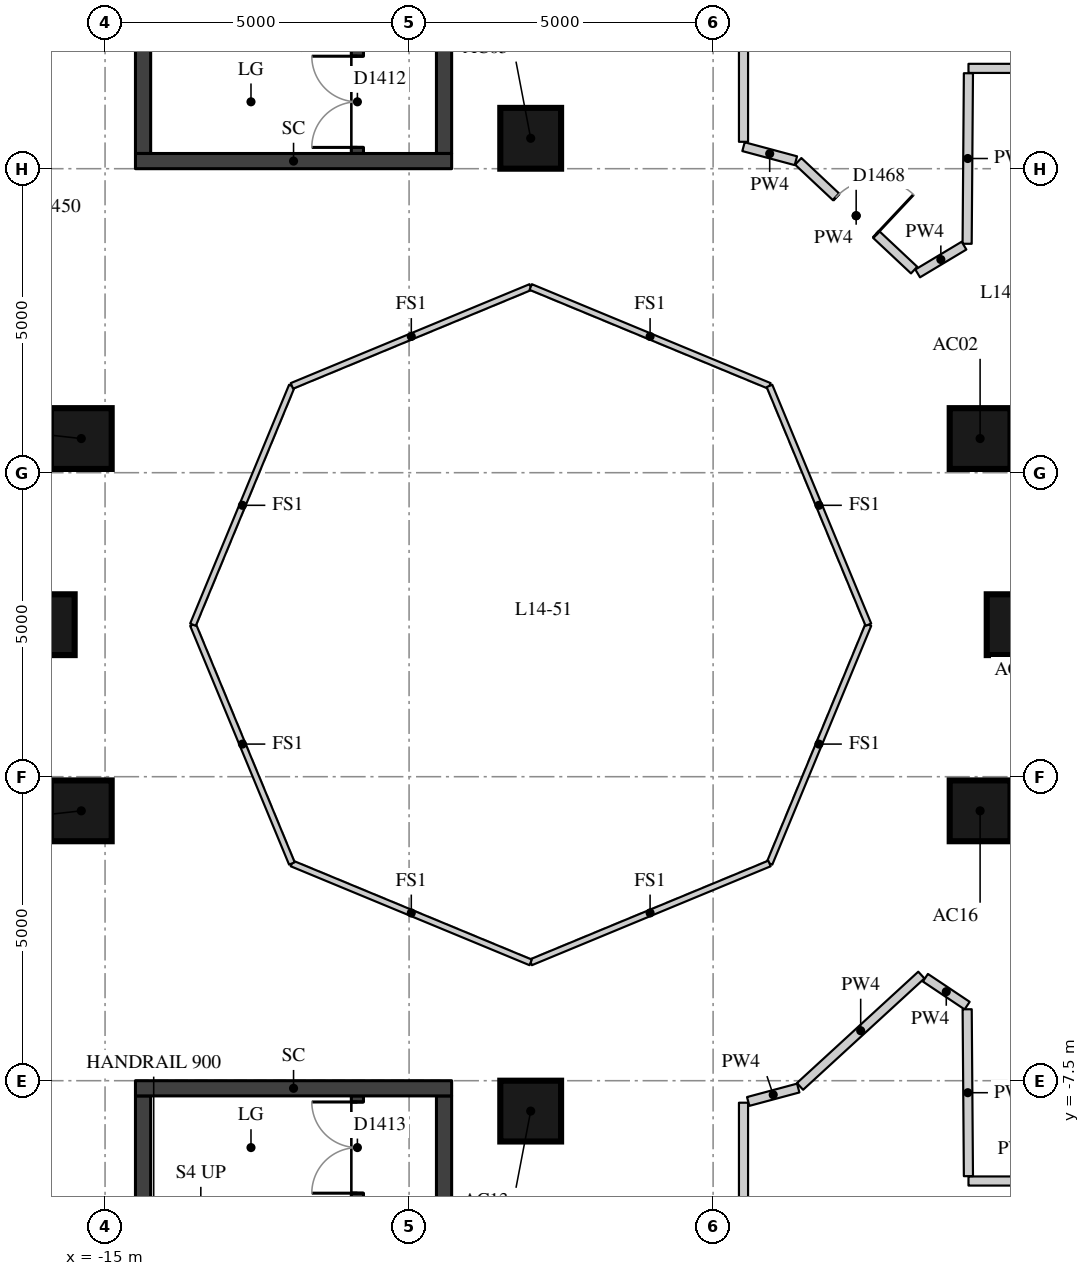
"""IFC4 building model, lengths in metres.
Left out: names, types, materials, properties, quantities, classifications, styles, units other than length and angle.
Written with IfcOpenShell. Run it as: python <this file> out.ifc"""

import sys

from ifc_helpers import new_model, si_unit, direction, frame, frame_2d, origin, origin_2d, place, context, subcontext, project, spatial, rectangle, extrude, element, fill, save


model = new_model("IFC4")
c1 = context("Model", 3, precision=1e-05, world=origin(), true_north=direction((0.0, 1.0)))
c2 = subcontext(c1, "Body", "Model", "MODEL_VIEW")
j1 = project(units=[si_unit("LENGTHUNIT", "METRE"), si_unit("PLANEANGLEUNIT", "RADIAN")], contexts=[c1])
p1 = place(None, origin())
s1 = spatial("IfcSite", under=j1, at=p1, CompositionType="ELEMENT")
p2 = place(p1, origin())
s2 = spatial("IfcBuilding", under=s1, at=p2, CompositionType="ELEMENT")
p3 = place(p2, frame((0.0, 0.0, 54.7)))
s3 = spatial("IfcBuildingStorey", under=s2, at=p3, CompositionType="ELEMENT", Elevation=54.7)
for number, where, z_axis, x_axis in (
    (1, (0.0, 0.0, 0.0), (0.0, 0.0, 1.0), (1.0, 0.0, 0.0)),
    (2, (-0.609, 3.062, 0.0), (0.0, 0.0, 1.0), (1.0, 0.0, 0.0)),
    (3, (-8.0, 8.0, 0.0), (0.0, 0.0, 1.0), (1.0, 0.0, 0.0)),
    (4, (-15.391, 3.062, 0.0), (0.0, 0.0, 1.0), (1.0, 0.0, 0.0)),
    (5, (-16.0, 0.0, 0.0), (0.0, 0.0, 1.0), (1.0, 0.0, 0.0)),
    (6, (-15.391, -3.062, 0.0), (0.0, 0.0, 1.0), (1.0, 0.0, 0.0)),
    (7, (-8.0, -8.0, 0.0), (0.0, 0.0, 1.0), (1.0, 0.0, 0.0)),
    (8, (-0.609, -3.062, 0.0), (0.0, 0.0, 1.0), (1.0, 0.0, 0.0)),
):
    element("IfcColumn", number, at=place(p3, frame(where, z_axis=z_axis, x_axis=x_axis)), inside=s3, PredefinedType="COLUMN", context=c2, shape_type="SweptSolid", body=[
        extrude(rectangle(XDim=1.0, YDim=1.0, at=origin_2d()), origin(), (0.0, 0.0, 1.0), 3.3),
    ])
p4 = place(p3, frame((-10.85, 7.75, 0.0), z_axis=(0.0, 0.0, 1.0), x_axis=(0.0, 1.0, 0.0)))
e9 = element("IfcWall", 9, at=p4, inside=s3, PredefinedType="SHEAR", context=c2, shape_type="SweptSolid", body=[
    extrude(rectangle(XDim=6.0, YDim=0.2, at=frame_2d((3.0, 0.0))), origin(), (0.0, 0.0, 1.0), 3.02),
])
p5 = place(p4, frame((0.1, 0.0, 0.0)))
e10 = element("IfcOpeningElement", 10, at=p5, cuts=e9, PredefinedType="OPENING", context=c2, shape_type="SweptSolid", body=[
    extrude(rectangle(XDim=1.5, YDim=2.1, at=frame_2d((0.75, 1.05))), frame((0.0, 0.11, 0.0), z_axis=(0.0, -1.0, 0.0), x_axis=(1.0, 0.0, 0.0)), (0.0, 0.0, 1.0), 0.22),
])
p6 = place(p3, frame((-10.85, -13.75, 0.0), z_axis=(0.0, 0.0, 1.0), x_axis=(0.0, 1.0, 0.0)))
e11 = element("IfcWall", 11, at=p6, inside=s3, PredefinedType="SHEAR", context=c2, shape_type="SweptSolid", body=[
    extrude(rectangle(XDim=6.0, YDim=0.2, at=frame_2d((3.0, 0.0))), origin(), (0.0, 0.0, 1.0), 3.02),
])
p7 = place(p6, frame((4.4, 0.0, 0.0)))
e12 = element("IfcOpeningElement", 12, at=p7, cuts=e11, PredefinedType="OPENING", context=c2, shape_type="SweptSolid", body=[
    extrude(rectangle(XDim=1.5, YDim=2.1, at=frame_2d((0.75, 1.05))), frame((0.0, 0.11, 0.0), z_axis=(0.0, -1.0, 0.0), x_axis=(1.0, 0.0, 0.0)), (0.0, 0.0, 1.0), 0.22),
])
p8 = place(p3, frame((-14.375, 7.75, -0.28), z_axis=(0.0, 0.0, 1.0), x_axis=(0.0, 1.0, 0.0)))
e13 = element("IfcWall", 13, at=p8, inside=s3, PredefinedType="SHEAR", context=c2, shape_type="SweptSolid", body=[
    extrude(rectangle(XDim=6.0, YDim=0.25, at=frame_2d((3.0, 0.0))), origin(), (0.0, 0.0, 1.0), 3.3),
])
p9 = place(p3, frame((-9.425, 7.75, -0.28), z_axis=(0.0, 0.0, 1.0), x_axis=(0.0, 1.0, 0.0)))
e14 = element("IfcWall", 14, at=p9, inside=s3, PredefinedType="SHEAR", context=c2, shape_type="SweptSolid", body=[
    extrude(rectangle(XDim=6.0, YDim=0.25, at=frame_2d((3.0, 0.0))), origin(), (0.0, 0.0, 1.0), 3.3),
])
p10 = place(p9, frame((2.1, 0.0, 0.28)))
e15 = element("IfcOpeningElement", 15, at=p10, cuts=e14, PredefinedType="OPENING", context=c2, shape_type="SweptSolid", body=[
    extrude(rectangle(XDim=1.5, YDim=2.1, at=frame_2d((0.75, 1.05))), frame((0.0, 0.135, 0.0), z_axis=(0.0, -1.0, 0.0), x_axis=(1.0, 0.0, 0.0)), (0.0, 0.0, 1.0), 0.27),
])
p11 = place(p3, frame((-14.5, 7.625, -0.28), z_axis=(0.0, 0.0, 1.0), x_axis=(1.0, 0.0, 0.0)))
e16 = element("IfcWall", 16, at=p11, inside=s3, PredefinedType="SHEAR", context=c2, shape_type="SweptSolid", body=[
    extrude(rectangle(XDim=5.2, YDim=0.25, at=frame_2d((2.6, 0.0))), origin(), (0.0, 0.0, 1.0), 3.3),
])
p12 = place(p3, frame((-14.375, -13.75, -0.28), z_axis=(0.0, 0.0, 1.0), x_axis=(0.0, 1.0, 0.0)))
e17 = element("IfcWall", 17, at=p12, inside=s3, PredefinedType="SHEAR", context=c2, shape_type="SweptSolid", body=[
    extrude(rectangle(XDim=6.0, YDim=0.25, at=frame_2d((3.0, 0.0))), origin(), (0.0, 0.0, 1.0), 3.3),
])
p13 = place(p3, frame((-9.425, -13.75, -0.28), z_axis=(0.0, 0.0, 1.0), x_axis=(0.0, 1.0, 0.0)))
e18 = element("IfcWall", 18, at=p13, inside=s3, PredefinedType="SHEAR", context=c2, shape_type="SweptSolid", body=[
    extrude(rectangle(XDim=6.0, YDim=0.25, at=frame_2d((3.0, 0.0))), origin(), (0.0, 0.0, 1.0), 3.3),
])
p14 = place(p13, frame((2.4, 0.0, 0.28)))
e19 = element("IfcOpeningElement", 19, at=p14, cuts=e18, PredefinedType="OPENING", context=c2, shape_type="SweptSolid", body=[
    extrude(rectangle(XDim=1.5, YDim=2.1, at=frame_2d((0.75, 1.05))), frame((0.0, 0.135, 0.0), z_axis=(0.0, -1.0, 0.0), x_axis=(1.0, 0.0, 0.0)), (0.0, 0.0, 1.0), 0.27),
])
p15 = place(p3, frame((-14.5, -7.625, -0.28), z_axis=(0.0, 0.0, 1.0), x_axis=(1.0, 0.0, 0.0)))
e20 = element("IfcWall", 20, at=p15, inside=s3, PredefinedType="SHEAR", context=c2, shape_type="SweptSolid", body=[
    extrude(rectangle(XDim=5.2, YDim=0.25, at=frame_2d((2.6, 0.0))), origin(), (0.0, 0.0, 1.0), 3.3),
])
p16 = place(p3, frame((0.72, 9.15, 0.0), z_axis=(0.0, 0.0, 1.0), x_axis=(-1.0, 0.0, 0.0)))
e21 = element("IfcWall", 21, at=p16, inside=s3, PredefinedType="PARTITIONING", context=c2, shape_type="SweptSolid", body=[
    extrude(rectangle(XDim=1.52, YDim=0.15, at=frame_2d((0.76, 0.0))), origin(), (0.0, 0.0, 1.0), 3.02),
])
p17 = place(p3, frame((-0.801, 9.07, 0.0), z_axis=(0.0, 0.0, 1.0), x_axis=(-0.007572902619, -0.999971325162, 0.0)))
e22 = element("IfcWall", 22, at=p17, inside=s3, PredefinedType="PARTITIONING", context=c2, shape_type="SweptSolid", body=[
    extrude(rectangle(XDim=2.805, YDim=0.15, at=frame_2d((1.402, 0.0))), origin(), (0.0, 0.0, 1.0), 3.02),
])
p18 = place(p3, frame((-0.874, 6.234, 0.0), z_axis=(0.0, 0.0, 1.0), x_axis=(-0.857759476535, -0.514051242984, 0.0)))
e23 = element("IfcWall", 23, at=p18, inside=s3, PredefinedType="PARTITIONING", context=c2, shape_type="SweptSolid", body=[
    extrude(rectangle(XDim=0.889, YDim=0.15, at=frame_2d((0.444, 0.0))), origin(), (0.0, 0.0, 1.0), 3.02),
])
p19 = place(p3, frame((-1.694, 5.832, 0.0), z_axis=(0.0, 0.0, 1.0), x_axis=(-0.729170056034, 0.684332542981, 0.0)))
e24 = element("IfcWall", 24, at=p19, inside=s3, PredefinedType="PARTITIONING", context=c2, shape_type="SweptSolid", body=[
    extrude(rectangle(XDim=2.614, YDim=0.15, at=frame_2d((1.307, 0.0))), origin(), (0.0, 0.0, 1.0), 3.02),
])
p20 = place(p19, frame((0.857, 0.0, 0.0)))
e25 = element("IfcOpeningElement", 25, at=p20, cuts=e24, PredefinedType="OPENING", context=c2, shape_type="SweptSolid", body=[
    extrude(rectangle(XDim=0.9, YDim=2.1, at=frame_2d((0.45, 1.05))), frame((0.0, 0.085, 0.0), z_axis=(0.0, -1.0, 0.0), x_axis=(1.0, 0.0, 0.0)), (0.0, 0.0, 1.0), 0.17),
])
p21 = place(p3, frame((-3.639, 7.631, 0.0), z_axis=(0.0, 0.0, 1.0), x_axis=(-0.965879594242, 0.258991523853, 0.0)))
e26 = element("IfcWall", 26, at=p21, inside=s3, PredefinedType="PARTITIONING", context=c2, shape_type="SweptSolid", body=[
    extrude(rectangle(XDim=0.892, YDim=0.15, at=frame_2d((0.446, 0.0))), origin(), (0.0, 0.0, 1.0), 3.02),
])
p22 = place(p3, frame((-4.5, 7.942, 0.0), z_axis=(0.0, 0.0, 1.0), x_axis=(0.0, 1.0, 0.0)))
e27 = element("IfcWall", 27, at=p22, inside=s3, PredefinedType="PARTITIONING", context=c2, shape_type="SweptSolid", body=[
    extrude(rectangle(XDim=3.808, YDim=0.15, at=frame_2d((1.904, 0.0))), origin(), (0.0, 0.0, 1.0), 3.02),
])
p23 = place(p3, frame((-0.8, -9.15, 0.0), z_axis=(0.0, 0.0, 1.0), x_axis=(1.0, 0.0, 0.0)))
e28 = element("IfcWall", 28, at=p23, inside=s3, PredefinedType="PARTITIONING", context=c2, shape_type="SweptSolid", body=[
    extrude(rectangle(XDim=1.6, YDim=0.15, at=frame_2d((0.8, 0.0))), origin(), (0.0, 0.0, 1.0), 3.02),
])
p24 = place(p3, frame((-4.5, -11.67, 0.0), z_axis=(0.0, 0.0, 1.0), x_axis=(0.0, 1.0, 0.0)))
e29 = element("IfcWall", 29, at=p24, inside=s3, PredefinedType="PARTITIONING", context=c2, shape_type="SweptSolid", body=[
    extrude(rectangle(XDim=3.808, YDim=0.15, at=frame_2d((1.904, 0.0))), origin(), (0.0, 0.0, 1.0), 3.02),
])
p25 = place(p3, frame((-4.423, -7.842, 0.0), z_axis=(0.0, 0.0, 1.0), x_axis=(0.965853333569, 0.259089440221, 0.0)))
e30 = element("IfcWall", 30, at=p25, inside=s3, PredefinedType="PARTITIONING", context=c2, shape_type="SweptSolid", body=[
    extrude(rectangle(XDim=0.852, YDim=0.15, at=frame_2d((0.426, 0.0))), origin(), (0.0, 0.0, 1.0), 3.02),
])
p26 = place(p3, frame((-3.571, -7.594, 0.0), z_axis=(0.0, 0.0, 1.0), x_axis=(0.736783660812, 0.676128565555, 0.0)))
e31 = element("IfcWall", 31, at=p26, inside=s3, PredefinedType="PARTITIONING", context=c2, shape_type="SweptSolid", body=[
    extrude(rectangle(XDim=2.709, YDim=0.15, at=frame_2d((1.354, 0.0))), origin(), (0.0, 0.0, 1.0), 3.02),
])
p27 = place(p3, frame((-1.509, -5.806, 0.0), z_axis=(0.0, 0.0, 1.0), x_axis=(0.831367153095, -0.55572354346, 0.0)))
e32 = element("IfcWall", 32, at=p27, inside=s3, PredefinedType="PARTITIONING", context=c2, shape_type="SweptSolid", body=[
    extrude(rectangle(XDim=0.825, YDim=0.15, at=frame_2d((0.413, 0.0))), origin(), (0.0, 0.0, 1.0), 3.02),
])
p28 = place(p3, frame((-0.822, -6.325, 0.0), z_axis=(0.0, 0.0, 1.0), x_axis=(0.007471771501, -0.999972085926, 0.0)))
e33 = element("IfcWall", 33, at=p28, inside=s3, PredefinedType="PARTITIONING", context=c2, shape_type="SweptSolid", body=[
    extrude(rectangle(XDim=2.745, YDim=0.15, at=frame_2d((1.372, 0.0))), origin(), (0.0, 0.0, 1.0), 3.02),
])
for number, where, z_axis, x_axis in (
    (34, (-2.446, 0.0, 0.0), (0.0, 0.0, 1.0), (-0.383, -0.924, 0.0)),
    (35, (-4.073, -3.927, 0.0), (0.0, 0.0, 1.0), (-0.924, -0.383, 0.0)),
    (36, (-8.0, -5.554, 0.0), (0.0, 0.0, 1.0), (-0.924, 0.383, 0.0)),
    (37, (-11.927, -3.927, 0.0), (0.0, 0.0, 1.0), (-0.383, 0.924, 0.0)),
    (38, (-13.554, 0.0, 0.0), (0.0, 0.0, 1.0), (0.383, 0.924, 0.0)),
    (39, (-11.927, 3.927, 0.0), (0.0, 0.0, 1.0), (0.924, 0.383, 0.0)),
    (40, (-8.0, 5.554, 0.0), (0.0, 0.0, 1.0), (0.924, -0.383, 0.0)),
    (41, (-4.073, 3.927, 0.0), (0.0, 0.0, 1.0), (0.383, -0.924, 0.0)),
):
    element("IfcWall", number, at=place(p3, frame(where, z_axis=z_axis, x_axis=x_axis)), inside=s3, PredefinedType="PARTITIONING", context=c2, shape_type="SweptSolid", body=[
        extrude(rectangle(XDim=4.251, YDim=0.1, at=frame_2d((2.125, 0.0))), origin(), (0.0, 0.0, 1.0), 3.02),
    ])
p29 = place(p5, origin())
e42 = element("IfcDoor", 42, at=p29, inside=s3, OperationType="DOUBLE_DOOR_SINGLE_SWING", PredefinedType="DOOR", context=c2, shape_type="SweptSolid", body=[
    extrude(rectangle(XDim=1.5, YDim=2.1, at=frame_2d((0.75, 1.05))), frame((0.0, 0.025, 0.0), z_axis=(0.0, -1.0, 0.0), x_axis=(1.0, 0.0, 0.0)), (0.0, 0.0, 1.0), 0.05),
])
fill(e10, e42)
p30 = place(p7, origin())
e43 = element("IfcDoor", 43, at=p30, inside=s3, OperationType="DOUBLE_DOOR_SINGLE_SWING", PredefinedType="DOOR", context=c2, shape_type="SweptSolid", body=[
    extrude(rectangle(XDim=1.5, YDim=2.1, at=frame_2d((0.75, 1.05))), frame((0.0, 0.025, 0.0), z_axis=(0.0, -1.0, 0.0), x_axis=(1.0, 0.0, 0.0)), (0.0, 0.0, 1.0), 0.05),
])
fill(e12, e43)
p31 = place(p20, origin())
e44 = element("IfcDoor", 44, at=p31, inside=s3, OperationType="SINGLE_SWING_RIGHT", PredefinedType="DOOR", context=c2, shape_type="SweptSolid", body=[
    extrude(rectangle(XDim=0.9, YDim=2.1, at=frame_2d((0.45, 1.05))), frame((0.0, 0.025, 0.0), z_axis=(0.0, -1.0, 0.0), x_axis=(1.0, 0.0, 0.0)), (0.0, 0.0, 1.0), 0.05),
])
fill(e25, e44)
save(model, sys.argv[1])
